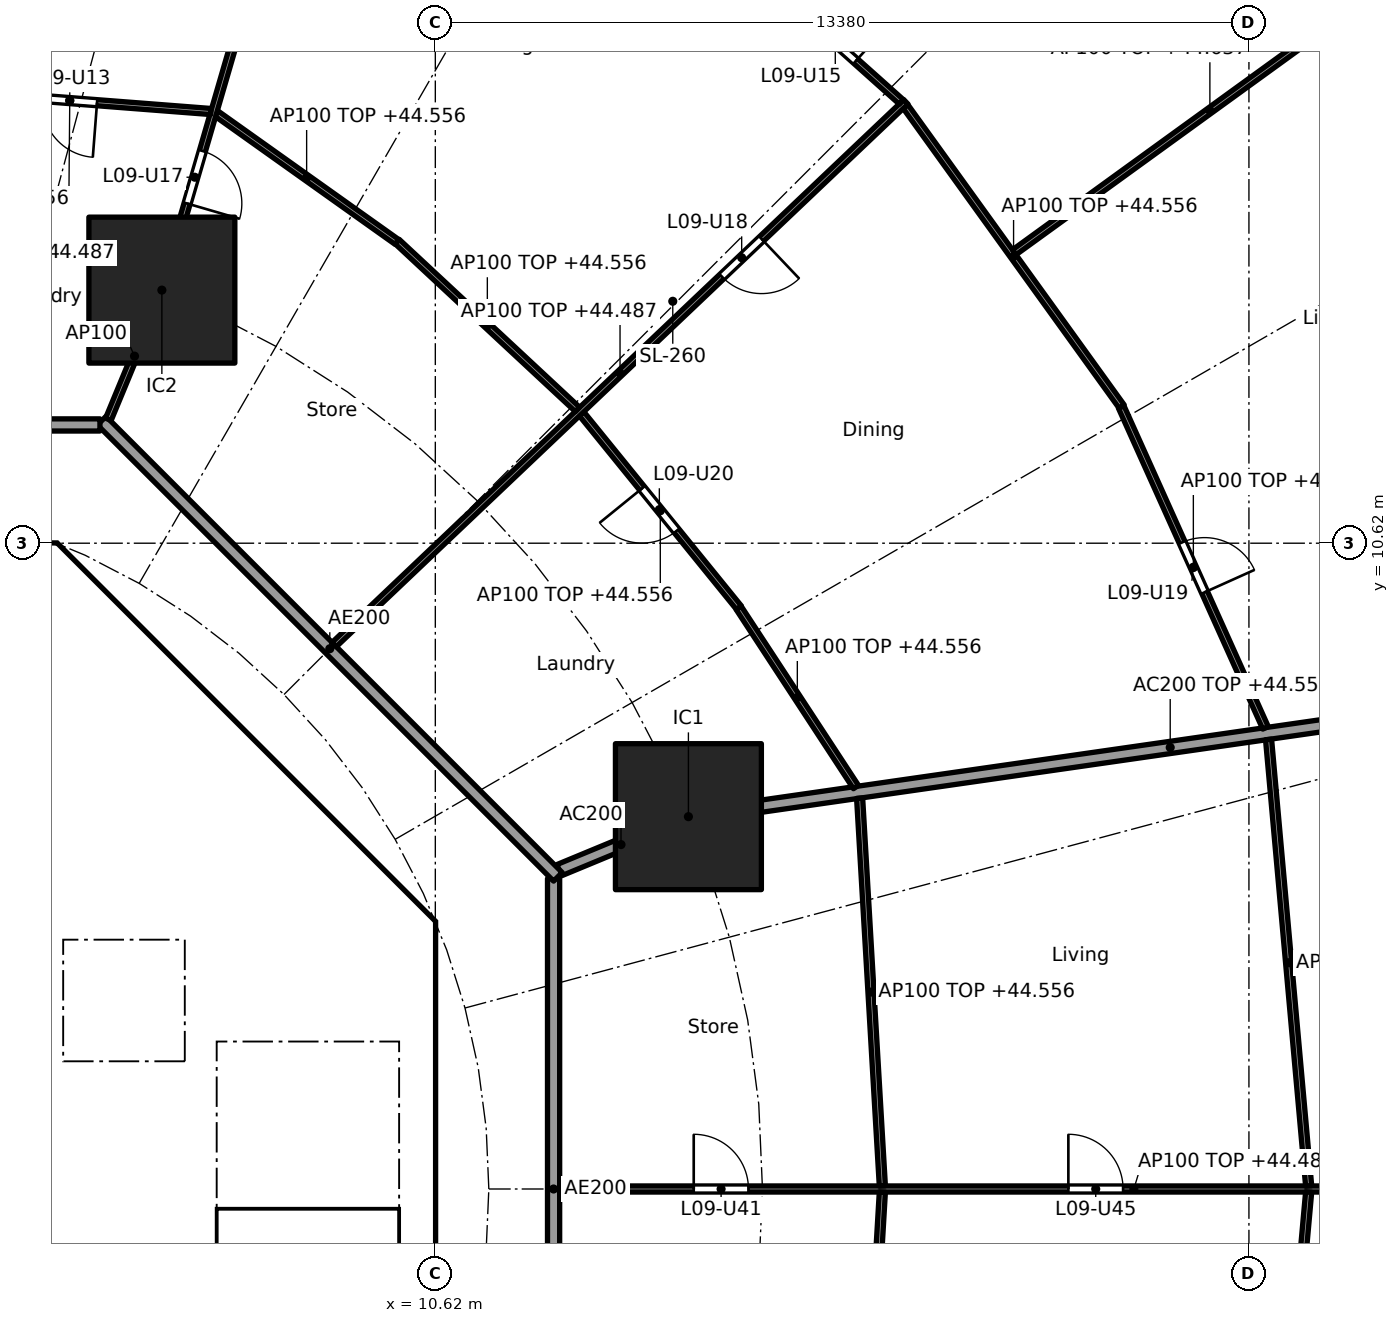
"""IFC4 building model, lengths in metres.
Left out: names, types, materials, properties, quantities, classifications, styles, units other than length and angle.
Written with IfcOpenShell. Run it as: python <this file> out.ifc"""

import sys

from ifc_helpers import new_model, si_unit, direction, frame, frame_2d, origin, origin_2d, place, context, subcontext, project, spatial, polyline, rectangle, outline, extrude, element, fill, save


model = new_model("IFC4")
c1 = context("Model", 3, precision=1e-05, world=origin(), true_north=direction((0.0, 1.0)))
c2 = subcontext(c1, "Body", "Model", "MODEL_VIEW")
j1 = project(units=[si_unit("LENGTHUNIT", "METRE"), si_unit("PLANEANGLEUNIT", "RADIAN")], contexts=[c1])
p1 = place(None, origin())
s1 = spatial("IfcSite", under=j1, at=p1, CompositionType="ELEMENT")
p2 = place(p1, origin())
s2 = spatial("IfcBuilding", under=s1, at=p2, CompositionType="ELEMENT")
p3 = place(p2, frame((0.0, 0.0, 41.8)))
s3 = spatial("IfcBuildingStorey", under=s2, at=p3, CompositionType="ELEMENT", Elevation=41.8)
for number, where, z_axis, x_axis in (
    (1, (14.782, 6.123, 0.0), (0.0, 0.0, 1.0), (1.0, 0.0, 0.0)),
    (2, (6.123, 14.782, 0.0), (0.0, 0.0, 1.0), (1.0, 0.0, 0.0)),
):
    element("IfcColumn", number, at=place(p3, frame(where, z_axis=z_axis, x_axis=x_axis)), inside=s3, PredefinedType="COLUMN", context=c2, shape_type="SweptSolid", body=[
        extrude(rectangle(XDim=2.4, YDim=2.4, at=origin_2d()), origin(), (0.0, 0.0, 1.0), 3.7),
    ])
p4 = place(p3, frame((9.988, 4.613, 0.0), z_axis=(0.0, 0.0, 1.0), x_axis=(-0.707106781187, 0.707106781187, 0.0)))
e3 = element("IfcWall", 3, at=p4, inside=s3, PredefinedType="SHEAR", context=c2, shape_type="SweptSolid", body=[
    extrude(rectangle(XDim=7.602, YDim=0.6, at=frame_2d((3.801, 0.0))), origin(), (0.0, 0.0, 1.0), 3.44),
])
p5 = place(p4, frame((3.201, 0.0, 0.0)))
e4 = element("IfcOpeningElement", 4, at=p5, cuts=e3, PredefinedType="OPENING", context=c2, shape_type="SweptSolid", body=[
    extrude(rectangle(XDim=1.2, YDim=2.1, at=frame_2d((0.6, 1.05))), frame((0.0, 0.31, 0.0), z_axis=(0.0, -1.0, 0.0), x_axis=(1.0, 0.0, 0.0)), (0.0, 0.0, 1.0), 0.62),
])
p6 = place(p3, frame((-6.7, 2.0, 0.0), z_axis=(0.0, 0.0, 1.0), x_axis=(1.0, 0.0, 0.0)))
e5 = element("IfcWall", 5, at=p6, inside=s3, PredefinedType="SOLIDWALL", context=c2, shape_type="SweptSolid", body=[
    extrude(rectangle(XDim=13.4, YDim=0.2, at=frame_2d((6.7, 0.0))), origin(), (0.0, 0.0, 1.0), 3.44),
])
p7 = place(p6, frame((0.65, 0.0, 0.0)))
e6 = element("IfcOpeningElement", 6, at=p7, cuts=e5, PredefinedType="OPENING", context=c2, shape_type="SweptSolid", body=[
    extrude(rectangle(XDim=1.1, YDim=2.1, at=frame_2d((0.55, 1.05))), frame((0.0, 0.11, 0.0), z_axis=(0.0, -1.0, 0.0), x_axis=(1.0, 0.0, 0.0)), (0.0, 0.0, 1.0), 0.22),
])
p8 = place(p6, frame((2.85, 0.0, 0.0)))
e7 = element("IfcOpeningElement", 7, at=p8, cuts=e5, PredefinedType="OPENING", context=c2, shape_type="SweptSolid", body=[
    extrude(rectangle(XDim=1.1, YDim=2.1, at=frame_2d((0.55, 1.05))), frame((0.0, 0.11, 0.0), z_axis=(0.0, -1.0, 0.0), x_axis=(1.0, 0.0, 0.0)), (0.0, 0.0, 1.0), 0.22),
])
p9 = place(p6, frame((5.05, 0.0, 0.0)))
e8 = element("IfcOpeningElement", 8, at=p9, cuts=e5, PredefinedType="OPENING", context=c2, shape_type="SweptSolid", body=[
    extrude(rectangle(XDim=1.1, YDim=2.1, at=frame_2d((0.55, 1.05))), frame((0.0, 0.11, 0.0), z_axis=(0.0, -1.0, 0.0), x_axis=(1.0, 0.0, 0.0)), (0.0, 0.0, 1.0), 0.22),
])
p10 = place(p3, frame((6.7, 4.0, 0.0), z_axis=(0.0, 0.0, 1.0), x_axis=(1.0, 0.0, 0.0)))
e9 = element("IfcWall", 9, at=p10, inside=s3, PredefinedType="SOLIDWALL", context=c2, shape_type="SweptSolid", body=[
    extrude(rectangle(XDim=3.325, YDim=0.2, at=frame_2d((1.662, 0.0))), origin(), (0.0, 0.0, 1.0), 3.44),
])
p11 = place(p10, frame((1.25, 0.0, 0.0)))
e10 = element("IfcOpeningElement", 10, at=p11, cuts=e9, PredefinedType="OPENING", context=c2, shape_type="SweptSolid", body=[
    extrude(rectangle(XDim=1.1, YDim=2.1, at=frame_2d((0.55, 1.05))), frame((0.0, 0.11, 0.0), z_axis=(0.0, -1.0, 0.0), x_axis=(1.0, 0.0, 0.0)), (0.0, 0.0, 1.0), 0.22),
])
p12 = place(p3, origin())
e11 = element("IfcWall", 11, at=p12, inside=s3, PredefinedType="SHEAR", context=c2, shape_type="SweptSolid", body=[
    extrude(outline(polyline([(-4.152, 10.025), (-4.401, 9.776), (-4.825, 10.2), (-4.401, 10.625), (4.401, 10.625), (4.825, 10.2), (4.401, 9.776), (4.152, 10.025), (-4.152, 10.025)])), origin(), (0.0, 0.0, 1.0), 3.44),
])
p13 = place(p3, origin())
e12 = element("IfcWall", 12, at=p13, inside=s3, PredefinedType="SHEAR", context=c2, shape_type="SweptSolid", body=[
    extrude(outline(polyline([(9.776, -4.401), (10.025, -4.152), (10.025, -3.801), (10.025, 4.152), (9.776, 4.401), (10.2, 4.825), (10.625, 4.401), (10.625, -4.401), (10.2, -4.825), (9.776, -4.401)])), origin(), (0.0, 0.0, 1.0), 3.44),
])
p14 = place(p3, origin())
e13 = element("IfcWall", 13, at=p14, inside=s3, PredefinedType="SOLIDWALL", context=c2, shape_type="SweptSolid", body=[
    extrude(outline(polyline([(-6.5, 2.1), (-6.7, 2.1), (-6.7, 4.3), (6.7, 4.3), (6.7, 2.1), (6.5, 2.1), (6.5, 4.1), (4.5, 4.1), (4.5, 2.1), (4.3, 2.1), (4.3, 4.1), (2.3, 4.1), (2.3, 2.1), (2.1, 2.1), (2.1, 4.1), (0.1, 4.1), (0.1, 2.1), (-0.1, 2.1), (-0.1, 4.1), (-2.1, 4.1), (-2.1, 2.1), (-2.3, 2.1), (-2.3, 4.1), (-4.3, 4.1), (-4.3, 2.1), (-4.5, 2.1), (-4.5, 4.1), (-6.5, 4.1), (-6.5, 2.1)])), origin(), (0.0, 0.0, 1.0), 3.44),
])
p15 = place(p3, origin())
e14 = element("IfcWall", 14, at=p15, inside=s3, PredefinedType="SOLIDWALL", context=c2, shape_type="SweptSolid", body=[
    extrude(outline(polyline([(7.025, -3.9), (6.7, -3.9), (6.7, 3.9), (7.025, 3.9), (7.025, -3.9)])), origin(), (0.0, 0.0, 1.0), 3.44),
])
p16 = place(p3, frame((12.657, 5.243, 0.0), z_axis=(0.0, 0.0, 1.0), x_axis=(0.923853160736, 0.382747093259, 0.0)))
e15 = element("IfcWall", 15, at=p16, inside=s3, PredefinedType="PARTITIONING", context=c2, shape_type="SweptSolid", body=[
    extrude(rectangle(XDim=2.2, YDim=0.2, at=frame_2d((1.1, 0.0))), origin(), (0.0, 0.0, 1.0), 3.44),
])
p17 = place(p3, frame((14.832, 6.13, 0.0), z_axis=(0.0, 0.0, 1.0), x_axis=(0.989836541293, 0.142209779978, 0.0)))
e16 = element("IfcWall", 16, at=p17, inside=s3, PredefinedType="PARTITIONING", context=c2, shape_type="SweptSolid", body=[
    extrude(rectangle(XDim=15.909, YDim=0.2, at=frame_2d((7.955, 0.0))), origin(), (0.0, 0.0, 1.0), 2.756),
])
p18 = place(p3, frame((12.565, -5.104, 0.0), z_axis=(0.0, 0.0, 1.0), x_axis=(0.0, 1.0, 0.0)))
e17 = element("IfcWall", 17, at=p18, inside=s3, PredefinedType="PARTITIONING", context=c2, shape_type="SweptSolid", body=[
    extrude(rectangle(XDim=10.209, YDim=0.2, at=frame_2d((5.104, 0.0))), origin(), (0.0, 0.0, 1.0), 3.44),
])
p19 = place(p3, frame((12.635, 5.134, 0.0), z_axis=(0.0, 0.0, 1.0), x_axis=(-0.707106781187, 0.707106781187, 0.0)))
e18 = element("IfcWall", 18, at=p19, inside=s3, PredefinedType="PARTITIONING", context=c2, shape_type="SweptSolid", body=[
    extrude(rectangle(XDim=10.609, YDim=0.2, at=frame_2d((5.305, 0.0))), origin(), (0.0, 0.0, 1.0), 3.44),
])
p20 = place(p3, frame((5.104, 12.565, 0.0), z_axis=(0.0, 0.0, 1.0), x_axis=(-1.0, 0.0, 0.0)))
e19 = element("IfcWall", 19, at=p20, inside=s3, PredefinedType="PARTITIONING", context=c2, shape_type="SweptSolid", body=[
    extrude(rectangle(XDim=10.409, YDim=0.2, at=frame_2d((5.205, 0.0))), origin(), (0.0, 0.0, 1.0), 3.44),
])
p21 = place(p3, frame((12.665, 0.0, 0.0), z_axis=(0.0, 0.0, 1.0), x_axis=(1.0, 0.0, 0.0)))
e20 = element("IfcWall", 20, at=p21, inside=s3, PredefinedType="PARTITIONING", context=c2, shape_type="SweptSolid", body=[
    extrude(rectangle(XDim=18.885, YDim=0.1, at=frame_2d((9.443, 0.0))), origin(), (0.0, 0.0, 1.0), 2.687),
])
p22 = place(p21, frame((2.205, 0.0, 0.0)))
e21 = element("IfcOpeningElement", 21, at=p22, cuts=e20, PredefinedType="OPENING", context=c2, shape_type="SweptSolid", body=[
    extrude(rectangle(XDim=0.9, YDim=2.1, at=frame_2d((0.45, 1.05))), frame((0.0, 0.06, 0.0), z_axis=(0.0, -1.0, 0.0), x_axis=(1.0, 0.0, 0.0)), (0.0, 0.0, 1.0), 0.12),
])
p23 = place(p21, frame((8.366, 0.0, 0.0)))
e22 = element("IfcOpeningElement", 22, at=p23, cuts=e20, PredefinedType="OPENING", context=c2, shape_type="SweptSolid", body=[
    extrude(rectangle(XDim=0.9, YDim=2.1, at=frame_2d((0.45, 1.05))), frame((0.0, 0.06, 0.0), z_axis=(0.0, -1.0, 0.0), x_axis=(1.0, 0.0, 0.0)), (0.0, 0.0, 1.0), 0.12),
])
p24 = place(p21, frame((15.154, 0.0, 0.0)))
e23 = element("IfcOpeningElement", 23, at=p24, cuts=e20, PredefinedType="OPENING", context=c2, shape_type="SweptSolid", body=[
    extrude(rectangle(XDim=0.9, YDim=2.1, at=frame_2d((0.45, 1.05))), frame((0.0, 0.06, 0.0), z_axis=(0.0, -1.0, 0.0), x_axis=(1.0, 0.0, 0.0)), (0.0, 0.0, 1.0), 0.12),
])
p25 = place(p3, frame((17.971, 0.05, 0.0), z_axis=(0.0, 0.0, 1.0), x_axis=(-0.058513659907, 0.998286607946, 0.0)))
e24 = element("IfcWall", 24, at=p25, inside=s3, PredefinedType="PARTITIONING", context=c2, shape_type="SweptSolid", body=[
    extrude(rectangle(XDim=6.388, YDim=0.1, at=frame_2d((3.194, 0.0))), origin(), (0.0, 0.0, 1.0), 2.756),
])
p26 = place(p3, frame((17.971, -0.05, 0.0), z_axis=(0.0, 0.0, 1.0), x_axis=(-0.058475267553, -0.998288857538, 0.0)))
e25 = element("IfcWall", 25, at=p26, inside=s3, PredefinedType="PARTITIONING", context=c2, shape_type="SweptSolid", body=[
    extrude(rectangle(XDim=6.438, YDim=0.1, at=frame_2d((3.219, 0.0))), origin(), (0.0, 0.0, 1.0), 2.756),
])
p27 = place(p3, frame((24.982, 0.05, 0.0), z_axis=(0.0, 0.0, 1.0), x_axis=(-0.08944290521, 0.995991951126, 0.0)))
e26 = element("IfcWall", 26, at=p27, inside=s3, PredefinedType="PARTITIONING", context=c2, shape_type="SweptSolid", body=[
    extrude(rectangle(XDim=7.373, YDim=0.1, at=frame_2d((3.686, 0.0))), origin(), (0.0, 0.0, 1.0), 2.756),
])
p28 = place(p3, frame((24.982, -0.05, 0.0), z_axis=(0.0, 0.0, 1.0), x_axis=(-0.089432471274, -0.995992888068, 0.0)))
e27 = element("IfcWall", 27, at=p28, inside=s3, PredefinedType="PARTITIONING", context=c2, shape_type="SweptSolid", body=[
    extrude(rectangle(XDim=7.423, YDim=0.1, at=frame_2d((3.711, 0.0))), origin(), (0.0, 0.0, 1.0), 2.756),
])
p29 = place(p3, frame((17.537, 6.61, 0.0), z_axis=(0.0, 0.0, 1.0), x_axis=(-0.547637987196, 0.836715384692, 0.0)))
e28 = element("IfcWall", 28, at=p29, inside=s3, PredefinedType="PARTITIONING", context=c2, shape_type="SweptSolid", body=[
    extrude(rectangle(XDim=3.52, YDim=0.1, at=frame_2d((1.76, 0.0))), origin(), (0.0, 0.0, 1.0), 2.756),
])
p30 = place(p3, frame((24.273, 7.584, 0.0), z_axis=(0.0, 0.0, 1.0), x_axis=(-0.410201529109, 0.911994904326, 0.0)))
e29 = element("IfcWall", 29, at=p30, inside=s3, PredefinedType="PARTITIONING", context=c2, shape_type="SweptSolid", body=[
    extrude(rectangle(XDim=5.787, YDim=0.1, at=frame_2d((2.894, 0.0))), origin(), (0.0, 0.0, 1.0), 2.756),
])
p31 = place(p30, frame((2.444, 0.0, 0.0)))
e30 = element("IfcOpeningElement", 30, at=p31, cuts=e29, PredefinedType="OPENING", context=c2, shape_type="SweptSolid", body=[
    extrude(rectangle(XDim=0.9, YDim=2.1, at=frame_2d((0.45, 1.05))), frame((0.0, 0.06, 0.0), z_axis=(0.0, -1.0, 0.0), x_axis=(1.0, 0.0, 0.0)), (0.0, 0.0, 1.0), 0.12),
])
p32 = place(p3, frame((15.614, 9.559, 0.0), z_axis=(0.0, 0.0, 1.0), x_axis=(-0.63012473344, 0.776493928056, 0.0)))
e31 = element("IfcWall", 31, at=p32, inside=s3, PredefinedType="PARTITIONING", context=c2, shape_type="SweptSolid", body=[
    extrude(rectangle(XDim=4.106, YDim=0.1, at=frame_2d((2.053, 0.0))), origin(), (0.0, 0.0, 1.0), 2.756),
])
p33 = place(p32, frame((1.628, 0.0, 0.0)))
e32 = element("IfcOpeningElement", 32, at=p33, cuts=e31, PredefinedType="OPENING", context=c2, shape_type="SweptSolid", body=[
    extrude(rectangle(XDim=0.9, YDim=2.1, at=frame_2d((0.45, 1.05))), frame((0.0, 0.06, 0.0), z_axis=(0.0, -1.0, 0.0), x_axis=(1.0, 0.0, 0.0)), (0.0, 0.0, 1.0), 0.12),
])
p34 = place(p3, frame((21.908, 12.866, 0.0), z_axis=(0.0, 0.0, 1.0), x_axis=(-0.584558392935, 0.811351640936, 0.0)))
e33 = element("IfcWall", 33, at=p34, inside=s3, PredefinedType="PARTITIONING", context=c2, shape_type="SweptSolid", body=[
    extrude(rectangle(XDim=6.084, YDim=0.1, at=frame_2d((3.042, 0.0))), origin(), (0.0, 0.0, 1.0), 2.756),
])
p35 = place(p3, frame((20.141, 15.405, 0.0), z_axis=(0.0, 0.0, 1.0), x_axis=(0.809834895779, 0.58665785734, 0.0)))
e34 = element("IfcWall", 34, at=p35, inside=s3, PredefinedType="PARTITIONING", context=c2, shape_type="SweptSolid", body=[
    extrude(rectangle(XDim=7.945, YDim=0.1, at=frame_2d((3.973, 0.0))), origin(), (0.0, 0.0, 1.0), 2.837),
])
p36 = place(p3, frame((8.957, 8.953, 0.0), z_axis=(0.0, 0.0, 1.0), x_axis=(0.725250022034, 0.688485588476, 0.0)))
e35 = element("IfcWall", 35, at=p36, inside=s3, PredefinedType="PARTITIONING", context=c2, shape_type="SweptSolid", body=[
    extrude(rectangle(XDim=12.963, YDim=0.1, at=frame_2d((6.481, 0.0))), origin(), (0.0, 0.0, 1.0), 2.687),
])
p37 = place(p36, frame((8.79, 0.0, 0.0)))
e36 = element("IfcOpeningElement", 36, at=p37, cuts=e35, PredefinedType="OPENING", context=c2, shape_type="SweptSolid", body=[
    extrude(rectangle(XDim=0.9, YDim=2.1, at=frame_2d((0.45, 1.05))), frame((0.0, 0.06, 0.0), z_axis=(0.0, -1.0, 0.0), x_axis=(1.0, 0.0, 0.0)), (0.0, 0.0, 1.0), 0.12),
])
p38 = place(p3, frame((12.958, 12.82, 0.0), z_axis=(0.0, 0.0, 1.0), x_axis=(-0.732028724098, 0.681273768096, 0.0)))
e37 = element("IfcWall", 37, at=p38, inside=s3, PredefinedType="PARTITIONING", context=c2, shape_type="SweptSolid", body=[
    extrude(rectangle(XDim=4.05, YDim=0.1, at=frame_2d((2.025, 0.0))), origin(), (0.0, 0.0, 1.0), 2.756),
])
p39 = place(p3, frame((18.285, 17.877, 0.0), z_axis=(0.0, 0.0, 1.0), x_axis=(-0.745812746724, 0.666155647596, 0.0)))
e38 = element("IfcWall", 38, at=p39, inside=s3, PredefinedType="PARTITIONING", context=c2, shape_type="SweptSolid", body=[
    extrude(rectangle(XDim=5.931, YDim=0.1, at=frame_2d((2.965, 0.0))), origin(), (0.0, 0.0, 1.0), 2.756),
])
p40 = place(p39, frame((1.008, 0.0, 0.0)))
e39 = element("IfcOpeningElement", 39, at=p40, cuts=e38, PredefinedType="OPENING", context=c2, shape_type="SweptSolid", body=[
    extrude(rectangle(XDim=0.9, YDim=2.1, at=frame_2d((0.45, 1.05))), frame((0.0, 0.06, 0.0), z_axis=(0.0, -1.0, 0.0), x_axis=(1.0, 0.0, 0.0)), (0.0, 0.0, 1.0), 0.12),
])
p41 = place(p3, frame((9.989, 15.574, 0.0), z_axis=(0.0, 0.0, 1.0), x_axis=(-0.81494477814, 0.57953861699, 0.0)))
e40 = element("IfcWall", 40, at=p41, inside=s3, PredefinedType="PARTITIONING", context=c2, shape_type="SweptSolid", body=[
    extrude(rectangle(XDim=3.644, YDim=0.1, at=frame_2d((1.822, 0.0))), origin(), (0.0, 0.0, 1.0), 2.756),
])
p42 = place(p3, frame((5.243, 12.657, 0.0), z_axis=(0.0, 0.0, 1.0), x_axis=(0.382719158442, 0.923864733477, 0.0)))
e41 = element("IfcWall", 41, at=p42, inside=s3, PredefinedType="PARTITIONING", context=c2, shape_type="SweptSolid", body=[
    extrude(rectangle(XDim=2.25, YDim=0.1, at=frame_2d((1.125, 0.0))), origin(), (0.0, 0.0, 1.0), 3.44),
])
p43 = place(p3, frame((6.137, 14.83, 0.0), z_axis=(0.0, 0.0, 1.0), x_axis=(0.27985745069, 0.960041565399, 0.0)))
e42 = element("IfcWall", 42, at=p43, inside=s3, PredefinedType="PARTITIONING", context=c2, shape_type="SweptSolid", body=[
    extrude(rectangle(XDim=16.705, YDim=0.1, at=frame_2d((8.353, 0.0))), origin(), (0.0, 0.0, 1.0), 2.756),
])
p44 = place(p43, frame((6.091, 0.0, 0.0)))
e43 = element("IfcOpeningElement", 43, at=p44, cuts=e42, PredefinedType="OPENING", context=c2, shape_type="SweptSolid", body=[
    extrude(rectangle(XDim=0.9, YDim=2.1, at=frame_2d((0.45, 1.05))), frame((0.0, 0.06, 0.0), z_axis=(0.0, -1.0, 0.0), x_axis=(1.0, 0.0, 0.0)), (0.0, 0.0, 1.0), 0.12),
])
p45 = place(p43, frame((1.434, 0.0, 0.0)))
e44 = element("IfcOpeningElement", 44, at=p45, cuts=e42, PredefinedType="OPENING", context=c2, shape_type="SweptSolid", body=[
    extrude(rectangle(XDim=0.9, YDim=2.1, at=frame_2d((0.45, 1.05))), frame((0.0, 0.06, 0.0), z_axis=(0.0, -1.0, 0.0), x_axis=(1.0, 0.0, 0.0)), (0.0, 0.0, 1.0), 0.12),
])
p46 = place(p3, frame((6.928, 17.719, 0.0), z_axis=(0.0, 0.0, 1.0), x_axis=(-0.997017959142, 0.077169872028, 0.0)))
e45 = element("IfcWall", 45, at=p46, inside=s3, PredefinedType="PARTITIONING", context=c2, shape_type="SweptSolid", body=[
    extrude(rectangle(XDim=4.654, YDim=0.1, at=frame_2d((2.327, 0.0))), origin(), (0.0, 0.0, 1.0), 2.756),
])
p47 = place(p46, frame((1.877, 0.0, 0.0)))
e46 = element("IfcOpeningElement", 46, at=p47, cuts=e45, PredefinedType="OPENING", context=c2, shape_type="SweptSolid", body=[
    extrude(rectangle(XDim=0.9, YDim=2.1, at=frame_2d((0.45, 1.05))), frame((0.0, 0.06, 0.0), z_axis=(0.0, -1.0, 0.0), x_axis=(1.0, 0.0, 0.0)), (0.0, 0.0, 1.0), 0.12),
])
p48 = place(p11, frame((1.1, 0.0, 0.0), x_axis=(-1.0, 0.0, 0.0)))
e47 = element("IfcDoor", 47, at=p48, inside=s3, OperationType="SINGLE_SWING_RIGHT", PredefinedType="DOOR", context=c2, shape_type="SweptSolid", body=[
    extrude(rectangle(XDim=1.1, YDim=2.1, at=frame_2d((0.55, 1.05))), frame((0.0, 0.025, 0.0), z_axis=(0.0, -1.0, 0.0), x_axis=(1.0, 0.0, 0.0)), (0.0, 0.0, 1.0), 0.05),
])
fill(e10, e47)
p49 = place(p5, origin())
e48 = element("IfcDoor", 48, at=p49, inside=s3, OperationType="SINGLE_SWING_RIGHT", PredefinedType="DOOR", context=c2, shape_type="SweptSolid", body=[
    extrude(rectangle(XDim=1.2, YDim=2.1, at=frame_2d((0.6, 1.05))), frame((0.0, 0.025, 0.0), z_axis=(0.0, -1.0, 0.0), x_axis=(1.0, 0.0, 0.0)), (0.0, 0.0, 1.0), 0.05),
])
fill(e4, e48)
p50 = place(p47, origin())
e49 = element("IfcDoor", 49, at=p50, inside=s3, OperationType="SINGLE_SWING_LEFT", PredefinedType="DOOR", context=c2, shape_type="SweptSolid", body=[
    extrude(rectangle(XDim=0.9, YDim=2.1, at=frame_2d((0.45, 1.05))), frame((0.0, 0.025, 0.0), z_axis=(0.0, -1.0, 0.0), x_axis=(1.0, 0.0, 0.0)), (0.0, 0.0, 1.0), 0.05),
])
fill(e46, e49)
p51 = place(p40, frame((0.9, 0.0, 0.0), x_axis=(-1.0, 0.0, 0.0)))
e50 = element("IfcDoor", 50, at=p51, inside=s3, OperationType="SINGLE_SWING_RIGHT", PredefinedType="DOOR", context=c2, shape_type="SweptSolid", body=[
    extrude(rectangle(XDim=0.9, YDim=2.1, at=frame_2d((0.45, 1.05))), frame((0.0, 0.025, 0.0), z_axis=(0.0, -1.0, 0.0), x_axis=(1.0, 0.0, 0.0)), (0.0, 0.0, 1.0), 0.05),
])
fill(e39, e50)
p52 = place(p45, frame((0.9, 0.0, 0.0), x_axis=(-1.0, 0.0, 0.0)))
e51 = element("IfcDoor", 51, at=p52, inside=s3, OperationType="SINGLE_SWING_RIGHT", PredefinedType="DOOR", context=c2, shape_type="SweptSolid", body=[
    extrude(rectangle(XDim=0.9, YDim=2.1, at=frame_2d((0.45, 1.05))), frame((0.0, 0.025, 0.0), z_axis=(0.0, -1.0, 0.0), x_axis=(1.0, 0.0, 0.0)), (0.0, 0.0, 1.0), 0.05),
])
fill(e44, e51)
p53 = place(p37, frame((0.9, 0.0, 0.0), x_axis=(-1.0, 0.0, 0.0)))
e52 = element("IfcDoor", 52, at=p53, inside=s3, OperationType="SINGLE_SWING_LEFT", PredefinedType="DOOR", context=c2, shape_type="SweptSolid", body=[
    extrude(rectangle(XDim=0.9, YDim=2.1, at=frame_2d((0.45, 1.05))), frame((0.0, 0.025, 0.0), z_axis=(0.0, -1.0, 0.0), x_axis=(1.0, 0.0, 0.0)), (0.0, 0.0, 1.0), 0.05),
])
fill(e36, e52)
p54 = place(p31, frame((0.9, 0.0, 0.0), x_axis=(-1.0, 0.0, 0.0)))
e53 = element("IfcDoor", 53, at=p54, inside=s3, OperationType="SINGLE_SWING_RIGHT", PredefinedType="DOOR", context=c2, shape_type="SweptSolid", body=[
    extrude(rectangle(XDim=0.9, YDim=2.1, at=frame_2d((0.45, 1.05))), frame((0.0, 0.025, 0.0), z_axis=(0.0, -1.0, 0.0), x_axis=(1.0, 0.0, 0.0)), (0.0, 0.0, 1.0), 0.05),
])
fill(e30, e53)
p55 = place(p33, origin())
e54 = element("IfcDoor", 54, at=p55, inside=s3, OperationType="SINGLE_SWING_RIGHT", PredefinedType="DOOR", context=c2, shape_type="SweptSolid", body=[
    extrude(rectangle(XDim=0.9, YDim=2.1, at=frame_2d((0.45, 1.05))), frame((0.0, 0.025, 0.0), z_axis=(0.0, -1.0, 0.0), x_axis=(1.0, 0.0, 0.0)), (0.0, 0.0, 1.0), 0.05),
])
fill(e32, e54)
p56 = place(p22, origin())
e55 = element("IfcDoor", 55, at=p56, inside=s3, OperationType="SINGLE_SWING_LEFT", PredefinedType="DOOR", context=c2, shape_type="SweptSolid", body=[
    extrude(rectangle(XDim=0.9, YDim=2.1, at=frame_2d((0.45, 1.05))), frame((0.0, 0.025, 0.0), z_axis=(0.0, -1.0, 0.0), x_axis=(1.0, 0.0, 0.0)), (0.0, 0.0, 1.0), 0.05),
])
fill(e21, e55)
p57 = place(p23, origin())
e56 = element("IfcDoor", 56, at=p57, inside=s3, OperationType="SINGLE_SWING_LEFT", PredefinedType="DOOR", context=c2, shape_type="SweptSolid", body=[
    extrude(rectangle(XDim=0.9, YDim=2.1, at=frame_2d((0.45, 1.05))), frame((0.0, 0.025, 0.0), z_axis=(0.0, -1.0, 0.0), x_axis=(1.0, 0.0, 0.0)), (0.0, 0.0, 1.0), 0.05),
])
fill(e22, e56)
save(model, sys.argv[1])
